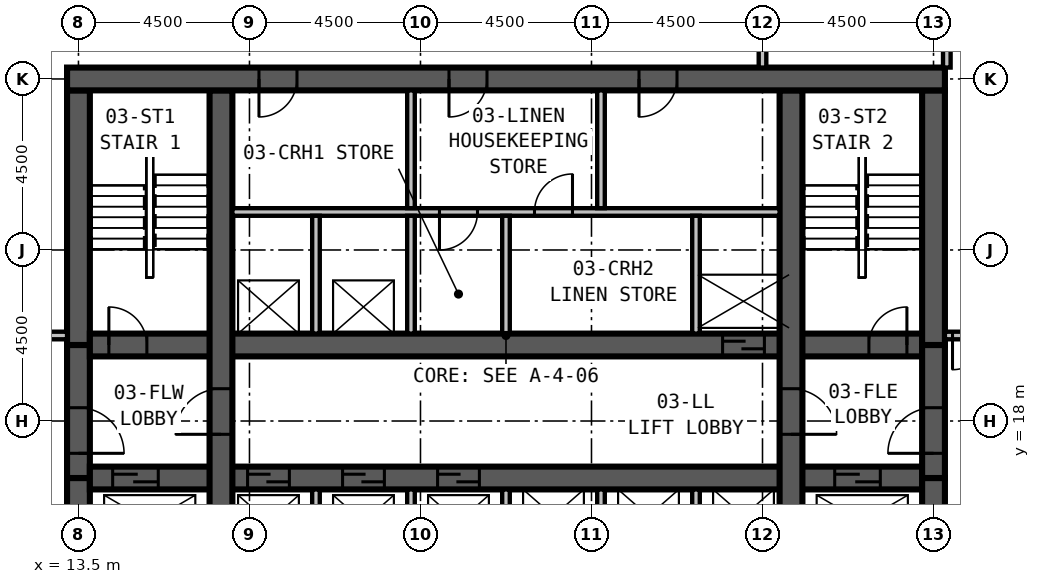
"""IFC4 building model, lengths in metres.
Left out: names, types, materials, properties, quantities, classifications, styles, units other than length and angle.
Written with IfcOpenShell. Run it as: python <this file> out.ifc"""

import sys

from ifc_helpers import new_model, si_unit, direction, frame, frame_2d, origin, place, context, subcontext, project, spatial, rectangle, extrude, element, fill, save


model = new_model("IFC4")
c1 = context("Model", 3, precision=1e-05, world=origin(), true_north=direction((0.0, 1.0)))
c2 = subcontext(c1, "Body", "Model", "MODEL_VIEW")
j1 = project(units=[si_unit("LENGTHUNIT", "METRE"), si_unit("PLANEANGLEUNIT", "RADIAN")], contexts=[c1])
p1 = place(None, origin())
s1 = spatial("IfcSite", under=j1, at=p1, CompositionType="ELEMENT")
p2 = place(p1, origin())
s2 = spatial("IfcBuilding", under=s1, at=p2, CompositionType="ELEMENT")
p3 = place(p2, frame((0.0, 0.0, 19.0)))
s3 = spatial("IfcBuildingStorey", under=s2, at=p3, CompositionType="ELEMENT", Elevation=19.0)
p4 = place(p3, frame((36.3, 27.0, 0.0), z_axis=(0.0, 0.0, 1.0), x_axis=(-1.0, 0.0, 0.0)))
e1 = element("IfcWall", 1, at=p4, inside=s3, PredefinedType="SHEAR", context=c2, shape_type="SweptSolid", body=[
    extrude(rectangle(XDim=23.1, YDim=0.6, at=frame_2d((11.55, 0.0))), origin(), (0.0, 0.0, 1.0), 5.0),
])
p5 = place(p4, frame((17.05, 0.0, 0.0)))
e2 = element("IfcOpeningElement", 2, at=p5, cuts=e1, PredefinedType="OPENING", context=c2, shape_type="SweptSolid", body=[
    extrude(rectangle(XDim=1.0, YDim=2.1, at=frame_2d((0.5, 1.05))), frame((0.0, 0.31, 0.0), z_axis=(0.0, -1.0, 0.0), x_axis=(1.0, 0.0, 0.0)), (0.0, 0.0, 1.0), 0.62),
])
p6 = place(p4, frame((12.05, 0.0, 0.0)))
e3 = element("IfcOpeningElement", 3, at=p6, cuts=e1, PredefinedType="OPENING", context=c2, shape_type="SweptSolid", body=[
    extrude(rectangle(XDim=1.0, YDim=2.1, at=frame_2d((0.5, 1.05))), frame((0.0, 0.31, 0.0), z_axis=(0.0, -1.0, 0.0), x_axis=(1.0, 0.0, 0.0)), (0.0, 0.0, 1.0), 0.62),
])
p7 = place(p4, frame((7.05, 0.0, 0.0)))
e4 = element("IfcOpeningElement", 4, at=p7, cuts=e1, PredefinedType="OPENING", context=c2, shape_type="SweptSolid", body=[
    extrude(rectangle(XDim=1.0, YDim=2.1, at=frame_2d((0.5, 1.05))), frame((0.0, 0.31, 0.0), z_axis=(0.0, -1.0, 0.0), x_axis=(1.0, 0.0, 0.0)), (0.0, 0.0, 1.0), 0.62),
])
p8 = place(p3, frame((17.25, 13.8, 0.0), z_axis=(0.0, 0.0, 1.0), x_axis=(0.0, 1.0, 0.0)))
e5 = element("IfcWall", 5, at=p8, inside=s3, PredefinedType="SHEAR", context=c2, shape_type="SweptSolid", body=[
    extrude(rectangle(XDim=12.9, YDim=0.6, at=frame_2d((6.45, 0.0))), origin(), (0.0, 0.0, 1.0), 5.0),
])
p9 = place(p8, frame((3.85, 0.0, 0.0)))
e6 = element("IfcOpeningElement", 6, at=p9, cuts=e5, PredefinedType="OPENING", context=c2, shape_type="SweptSolid", body=[
    extrude(rectangle(XDim=1.2, YDim=2.1, at=frame_2d((0.6, 1.05))), frame((0.0, 0.31, 0.0), z_axis=(0.0, -1.0, 0.0), x_axis=(1.0, 0.0, 0.0)), (0.0, 0.0, 1.0), 0.62),
])
p10 = place(p3, frame((32.25, 13.8, 0.0), z_axis=(0.0, 0.0, 1.0), x_axis=(0.0, 1.0, 0.0)))
e7 = element("IfcWall", 7, at=p10, inside=s3, PredefinedType="SHEAR", context=c2, shape_type="SweptSolid", body=[
    extrude(rectangle(XDim=12.9, YDim=0.6, at=frame_2d((6.45, 0.0))), origin(), (0.0, 0.0, 1.0), 5.0),
])
p11 = place(p10, frame((5.05, 0.0, 0.0), z_axis=(0.0, 0.0, 1.0), x_axis=(-1.0, 0.0, 0.0)))
e8 = element("IfcOpeningElement", 8, at=p11, cuts=e7, PredefinedType="OPENING", context=c2, shape_type="SweptSolid", body=[
    extrude(rectangle(XDim=1.2, YDim=2.1, at=frame_2d((0.6, 1.05))), frame((0.0, 0.31, 0.0), z_axis=(0.0, -1.0, 0.0), x_axis=(1.0, 0.0, 0.0)), (0.0, 0.0, 1.0), 0.62),
])
p12 = place(p3, frame((13.8, 16.5, 0.0), z_axis=(0.0, 0.0, 1.0), x_axis=(1.0, 0.0, 0.0)))
e9 = element("IfcWall", 9, at=p12, inside=s3, PredefinedType="SHEAR", context=c2, shape_type="SweptSolid", body=[
    extrude(rectangle(XDim=21.9, YDim=0.6, at=frame_2d((10.95, 0.0))), origin(), (0.0, 0.0, 1.0), 5.0),
])
p13 = place(p12, frame((4.15, 0.0, 0.0)))
e10 = element("IfcOpeningElement", 10, at=p13, cuts=e9, PredefinedType="OPENING", context=c2, shape_type="SweptSolid", body=[
    extrude(rectangle(XDim=1.1, YDim=2.1, at=frame_2d((0.55, 1.05))), frame((0.0, 0.31, 0.0), z_axis=(0.0, -1.0, 0.0), x_axis=(1.0, 0.0, 0.0)), (0.0, 0.0, 1.0), 0.62),
])
p14 = place(p12, frame((6.65, 0.0, 0.0)))
e11 = element("IfcOpeningElement", 11, at=p14, cuts=e9, PredefinedType="OPENING", context=c2, shape_type="SweptSolid", body=[
    extrude(rectangle(XDim=1.1, YDim=2.1, at=frame_2d((0.55, 1.05))), frame((0.0, 0.31, 0.0), z_axis=(0.0, -1.0, 0.0), x_axis=(1.0, 0.0, 0.0)), (0.0, 0.0, 1.0), 0.62),
])
p15 = place(p12, frame((9.15, 0.0, 0.0)))
e12 = element("IfcOpeningElement", 12, at=p15, cuts=e9, PredefinedType="OPENING", context=c2, shape_type="SweptSolid", body=[
    extrude(rectangle(XDim=1.1, YDim=2.1, at=frame_2d((0.55, 1.05))), frame((0.0, 0.31, 0.0), z_axis=(0.0, -1.0, 0.0), x_axis=(1.0, 0.0, 0.0)), (0.0, 0.0, 1.0), 0.62),
])
p16 = place(p12, frame((0.6, 0.0, 0.0)))
e13 = element("IfcOpeningElement", 13, at=p16, cuts=e9, PredefinedType="OPENING", context=c2, shape_type="SweptSolid", body=[
    extrude(rectangle(XDim=1.2, YDim=2.1, at=frame_2d((0.6, 1.05))), frame((0.0, 0.31, 0.0), z_axis=(0.0, -1.0, 0.0), x_axis=(1.0, 0.0, 0.0)), (0.0, 0.0, 1.0), 0.62),
])
p17 = place(p12, frame((19.6, 0.0, 0.0)))
e14 = element("IfcOpeningElement", 14, at=p17, cuts=e9, PredefinedType="OPENING", context=c2, shape_type="SweptSolid", body=[
    extrude(rectangle(XDim=1.2, YDim=2.1, at=frame_2d((0.6, 1.05))), frame((0.0, 0.31, 0.0), z_axis=(0.0, -1.0, 0.0), x_axis=(1.0, 0.0, 0.0)), (0.0, 0.0, 1.0), 0.62),
])
p18 = place(p3, frame((13.8, 20.0, 0.0), z_axis=(0.0, 0.0, 1.0), x_axis=(1.0, 0.0, 0.0)))
e15 = element("IfcWall", 15, at=p18, inside=s3, PredefinedType="SHEAR", context=c2, shape_type="SweptSolid", body=[
    extrude(rectangle(XDim=21.9, YDim=0.6, at=frame_2d((10.95, 0.0))), origin(), (0.0, 0.0, 1.0), 5.0),
])
p19 = place(p18, frame((0.5, 0.0, 0.0)))
e16 = element("IfcOpeningElement", 16, at=p19, cuts=e15, PredefinedType="OPENING", context=c2, shape_type="SweptSolid", body=[
    extrude(rectangle(XDim=1.0, YDim=2.1, at=frame_2d((0.5, 1.05))), frame((0.0, 0.31, 0.0), z_axis=(0.0, -1.0, 0.0), x_axis=(1.0, 0.0, 0.0)), (0.0, 0.0, 1.0), 0.62),
])
p20 = place(p18, frame((20.5, 0.0, 0.0)))
e17 = element("IfcOpeningElement", 17, at=p20, cuts=e15, PredefinedType="OPENING", context=c2, shape_type="SweptSolid", body=[
    extrude(rectangle(XDim=1.0, YDim=2.1, at=frame_2d((0.5, 1.05))), frame((0.0, 0.31, 0.0), z_axis=(0.0, -1.0, 0.0), x_axis=(1.0, 0.0, 0.0)), (0.0, 0.0, 1.0), 0.62),
])
p21 = place(p18, frame((16.65, 0.0, 0.0)))
e18 = element("IfcOpeningElement", 18, at=p21, cuts=e15, PredefinedType="OPENING", context=c2, shape_type="SweptSolid", body=[
    extrude(rectangle(XDim=1.1, YDim=2.1, at=frame_2d((0.55, 1.05))), frame((0.0, 0.31, 0.0), z_axis=(0.0, -1.0, 0.0), x_axis=(1.0, 0.0, 0.0)), (0.0, 0.0, 1.0), 0.62),
])
p22 = place(p3, frame((13.5, 26.7, 0.0), z_axis=(0.0, 0.0, 1.0), x_axis=(0.0, -1.0, 0.0)))
e19 = element("IfcWall", 19, at=p22, inside=s3, PredefinedType="SHEAR", context=c2, shape_type="SweptSolid", body=[
    extrude(rectangle(XDim=6.7, YDim=0.6, at=frame_2d((3.35, 0.0))), origin(), (0.0, 0.0, 1.0), 5.0),
])
p23 = place(p3, frame((13.5, 20.0, 0.0), z_axis=(0.0, 0.0, 1.0), x_axis=(0.0, -1.0, 0.0)))
e20 = element("IfcWall", 20, at=p23, inside=s3, PredefinedType="SHEAR", context=c2, shape_type="SweptSolid", body=[
    extrude(rectangle(XDim=3.5, YDim=0.6, at=frame_2d((1.75, 0.0))), origin(), (0.0, 0.0, 1.0), 5.0),
])
p24 = place(p23, frame((1.65, 0.0, 0.0)))
e21 = element("IfcOpeningElement", 21, at=p24, cuts=e20, PredefinedType="OPENING", context=c2, shape_type="SweptSolid", body=[
    extrude(rectangle(XDim=1.2, YDim=2.1, at=frame_2d((0.6, 1.05))), frame((0.0, 0.31, 0.0), z_axis=(0.0, -1.0, 0.0), x_axis=(1.0, 0.0, 0.0)), (0.0, 0.0, 1.0), 0.62),
])
for number, where, z_axis, x_axis in (
    (22, (13.5, 16.5, 0.0), (0.0, 0.0, 1.0), (0.0, -1.0, 0.0)),
    (23, (36.0, 13.8, 0.0), (0.0, 0.0, 1.0), (0.0, 1.0, 0.0)),
):
    element("IfcWall", number, at=place(p3, frame(where, z_axis=z_axis, x_axis=x_axis)), inside=s3, PredefinedType="SHEAR", context=c2, shape_type="SweptSolid", body=[
        extrude(rectangle(XDim=2.7, YDim=0.6, at=frame_2d((1.35, 0.0))), origin(), (0.0, 0.0, 1.0), 5.0),
    ])
p25 = place(p3, frame((36.0, 16.5, 0.0), z_axis=(0.0, 0.0, 1.0), x_axis=(0.0, 1.0, 0.0)))
e24 = element("IfcWall", 24, at=p25, inside=s3, PredefinedType="SHEAR", context=c2, shape_type="SweptSolid", body=[
    extrude(rectangle(XDim=3.5, YDim=0.6, at=frame_2d((1.75, 0.0))), origin(), (0.0, 0.0, 1.0), 5.0),
])
p26 = place(p25, frame((0.65, 0.0, 0.0)))
e25 = element("IfcOpeningElement", 25, at=p26, cuts=e24, PredefinedType="OPENING", context=c2, shape_type="SweptSolid", body=[
    extrude(rectangle(XDim=1.2, YDim=2.1, at=frame_2d((0.6, 1.05))), frame((0.0, 0.31, 0.0), z_axis=(0.0, -1.0, 0.0), x_axis=(1.0, 0.0, 0.0)), (0.0, 0.0, 1.0), 0.62),
])
p27 = place(p3, frame((36.0, 20.0, 0.0), z_axis=(0.0, 0.0, 1.0), x_axis=(0.0, 1.0, 0.0)))
e26 = element("IfcWall", 26, at=p27, inside=s3, PredefinedType="SHEAR", context=c2, shape_type="SweptSolid", body=[
    extrude(rectangle(XDim=6.7, YDim=0.6, at=frame_2d((3.35, 0.0))), origin(), (0.0, 0.0, 1.0), 5.0),
])
p28 = place(p3, frame((-0.9, 20.25, 0.0), z_axis=(0.0, 0.0, 1.0), x_axis=(1.0, 0.0, 0.0)))
e27 = element("IfcWall", 27, at=p28, inside=s3, PredefinedType="PARTITIONING", context=c2, shape_type="SweptSolid", body=[
    extrude(rectangle(XDim=14.1, YDim=0.2, at=frame_2d((7.05, 0.0))), origin(), (0.0, 0.0, 1.0), 4.7),
])
p29 = place(p28, frame((5.0, 0.0, 0.0)))
e28 = element("IfcOpeningElement", 28, at=p29, cuts=e27, PredefinedType="OPENING", context=c2, shape_type="SweptSolid", body=[
    extrude(rectangle(XDim=1.8, YDim=2.4, at=frame_2d((0.9, 1.2))), frame((0.0, 0.11, 0.0), z_axis=(0.0, -1.0, 0.0), x_axis=(1.0, 0.0, 0.0)), (0.0, 0.0, 1.0), 0.22),
])
p30 = place(p3, frame((36.3, 20.25, 0.0), z_axis=(0.0, 0.0, 1.0), x_axis=(1.0, 0.0, 0.0)))
e29 = element("IfcWall", 29, at=p30, inside=s3, PredefinedType="PARTITIONING", context=c2, shape_type="SweptSolid", body=[
    extrude(rectangle(XDim=13.2, YDim=0.2, at=frame_2d((6.6, 0.0))), origin(), (0.0, 0.0, 1.0), 4.7),
])
p31 = place(p30, frame((2.0, 0.0, 0.0), z_axis=(0.0, 0.0, 1.0), x_axis=(-1.0, 0.0, 0.0)))
e30 = element("IfcOpeningElement", 30, at=p31, cuts=e29, PredefinedType="OPENING", context=c2, shape_type="SweptSolid", body=[
    extrude(rectangle(XDim=1.8, YDim=2.4, at=frame_2d((0.9, 1.2))), frame((0.0, 0.11, 0.0), z_axis=(0.0, -1.0, 0.0), x_axis=(1.0, 0.0, 0.0)), (0.0, 0.0, 1.0), 0.22),
])
p32 = place(p3, frame((31.5, 27.3, 0.0), z_axis=(0.0, 0.0, 1.0), x_axis=(0.0, 1.0, 0.0)))
e31 = element("IfcWall", 31, at=p32, inside=s3, PredefinedType="PARTITIONING", context=c2, shape_type="SweptSolid", body=[
    extrude(rectangle(XDim=11.8, YDim=0.2, at=frame_2d((5.9, 0.0))), origin(), (0.0, 0.0, 1.0), 3.6),
])
p33 = place(p3, frame((36.35, 27.3, 0.0), z_axis=(0.0, 0.0, 1.0), x_axis=(0.0, 1.0, 0.0)))
e32 = element("IfcWall", 32, at=p33, inside=s3, PredefinedType="PARTITIONING", context=c2, shape_type="SweptSolid", body=[
    extrude(rectangle(XDim=2.7, YDim=0.2, at=frame_2d((1.35, 0.0))), origin(), (0.0, 0.0, 1.0), 3.6),
])
p34 = place(p3, frame((19.75, 13.8, 0.0), z_axis=(0.0, 0.0, 1.0), x_axis=(0.0, 1.0, 0.0)))
e33 = element("IfcWall", 33, at=p34, inside=s3, PredefinedType="PARTITIONING", context=c2, shape_type="SweptSolid", body=[
    extrude(rectangle(XDim=2.4, YDim=0.2, at=frame_2d((1.2, 0.0))), origin(), (0.0, 0.0, 1.0), 4.7),
])
p35 = place(p3, frame((19.75, 20.3, 0.0), z_axis=(0.0, 0.0, 1.0), x_axis=(0.0, 1.0, 0.0)))
e34 = element("IfcWall", 34, at=p35, inside=s3, PredefinedType="PARTITIONING", context=c2, shape_type="SweptSolid", body=[
    extrude(rectangle(XDim=3.1, YDim=0.2, at=frame_2d((1.55, 0.0))), origin(), (0.0, 0.0, 1.0), 4.7),
])
p36 = place(p3, frame((22.25, 13.8, 0.0), z_axis=(0.0, 0.0, 1.0), x_axis=(0.0, 1.0, 0.0)))
e35 = element("IfcWall", 35, at=p36, inside=s3, PredefinedType="PARTITIONING", context=c2, shape_type="SweptSolid", body=[
    extrude(rectangle(XDim=2.4, YDim=0.2, at=frame_2d((1.2, 0.0))), origin(), (0.0, 0.0, 1.0), 4.7),
])
p37 = place(p3, frame((22.25, 20.3, 0.0), z_axis=(0.0, 0.0, 1.0), x_axis=(0.0, 1.0, 0.0)))
e36 = element("IfcWall", 36, at=p37, inside=s3, PredefinedType="PARTITIONING", context=c2, shape_type="SweptSolid", body=[
    extrude(rectangle(XDim=3.1, YDim=0.2, at=frame_2d((1.55, 0.0))), origin(), (0.0, 0.0, 1.0), 4.7),
])
p38 = place(p3, frame((24.75, 13.8, 0.0), z_axis=(0.0, 0.0, 1.0), x_axis=(0.0, 1.0, 0.0)))
e37 = element("IfcWall", 37, at=p38, inside=s3, PredefinedType="PARTITIONING", context=c2, shape_type="SweptSolid", body=[
    extrude(rectangle(XDim=2.4, YDim=0.2, at=frame_2d((1.2, 0.0))), origin(), (0.0, 0.0, 1.0), 4.7),
])
p39 = place(p3, frame((24.75, 20.3, 0.0), z_axis=(0.0, 0.0, 1.0), x_axis=(0.0, 1.0, 0.0)))
e38 = element("IfcWall", 38, at=p39, inside=s3, PredefinedType="PARTITIONING", context=c2, shape_type="SweptSolid", body=[
    extrude(rectangle(XDim=3.1, YDim=0.2, at=frame_2d((1.55, 0.0))), origin(), (0.0, 0.0, 1.0), 4.7),
])
for number, where, z_axis, x_axis in (
    (39, (27.25, 13.8, 0.0), (0.0, 0.0, 1.0), (0.0, 1.0, 0.0)),
    (40, (29.75, 13.8, 0.0), (0.0, 0.0, 1.0), (0.0, 1.0, 0.0)),
):
    element("IfcWall", number, at=place(p3, frame(where, z_axis=z_axis, x_axis=x_axis)), inside=s3, PredefinedType="PARTITIONING", context=c2, shape_type="SweptSolid", body=[
        extrude(rectangle(XDim=2.4, YDim=0.2, at=frame_2d((1.2, 0.0))), origin(), (0.0, 0.0, 1.0), 4.7),
    ])
p40 = place(p3, frame((29.75, 20.3, 0.0), z_axis=(0.0, 0.0, 1.0), x_axis=(0.0, 1.0, 0.0)))
e41 = element("IfcWall", 41, at=p40, inside=s3, PredefinedType="PARTITIONING", context=c2, shape_type="SweptSolid", body=[
    extrude(rectangle(XDim=3.1, YDim=0.2, at=frame_2d((1.55, 0.0))), origin(), (0.0, 0.0, 1.0), 4.7),
])
p41 = place(p3, frame((17.55, 23.5, 0.0), z_axis=(0.0, 0.0, 1.0), x_axis=(1.0, 0.0, 0.0)))
e42 = element("IfcWall", 42, at=p41, inside=s3, PredefinedType="PARTITIONING", context=c2, shape_type="SweptSolid", body=[
    extrude(rectangle(XDim=14.4, YDim=0.2, at=frame_2d((7.2, 0.0))), origin(), (0.0, 0.0, 1.0), 4.7),
])
p42 = place(p41, frame((6.45, 0.0, 0.0), z_axis=(0.0, 0.0, 1.0), x_axis=(-1.0, 0.0, 0.0)))
e43 = element("IfcOpeningElement", 43, at=p42, cuts=e42, PredefinedType="OPENING", context=c2, shape_type="SweptSolid", body=[
    extrude(rectangle(XDim=1.0, YDim=2.1, at=frame_2d((0.5, 1.05))), frame((0.0, 0.11, 0.0), z_axis=(0.0, -1.0, 0.0), x_axis=(1.0, 0.0, 0.0)), (0.0, 0.0, 1.0), 0.22),
])
p43 = place(p41, frame((7.95, 0.0, 0.0)))
e44 = element("IfcOpeningElement", 44, at=p43, cuts=e42, PredefinedType="OPENING", context=c2, shape_type="SweptSolid", body=[
    extrude(rectangle(XDim=1.0, YDim=2.1, at=frame_2d((0.5, 1.05))), frame((0.0, 0.11, 0.0), z_axis=(0.0, -1.0, 0.0), x_axis=(1.0, 0.0, 0.0)), (0.0, 0.0, 1.0), 0.22),
])
for number, where, z_axis, x_axis in (
    (45, (22.25, 23.6, 0.0), (0.0, 0.0, 1.0), (0.0, 1.0, 0.0)),
    (46, (27.25, 23.6, 0.0), (0.0, 0.0, 1.0), (0.0, 1.0, 0.0)),
):
    element("IfcWall", number, at=place(p3, frame(where, z_axis=z_axis, x_axis=x_axis)), inside=s3, PredefinedType="PARTITIONING", context=c2, shape_type="SweptSolid", body=[
        extrude(rectangle(XDim=3.1, YDim=0.2, at=frame_2d((1.55, 0.0))), origin(), (0.0, 0.0, 1.0), 4.7),
    ])
p44 = place(p31, origin())
e47 = element("IfcDoor", 47, at=p44, inside=s3, OperationType="DOUBLE_DOOR_SINGLE_SWING", PredefinedType="DOOR", context=c2, shape_type="SweptSolid", body=[
    extrude(rectangle(XDim=1.8, YDim=2.4, at=frame_2d((0.9, 1.2))), frame((0.0, 0.025, 0.0), z_axis=(0.0, -1.0, 0.0), x_axis=(1.0, 0.0, 0.0)), (0.0, 0.0, 1.0), 0.05),
])
fill(e30, e47)
p45 = place(p42, origin())
e48 = element("IfcDoor", 48, at=p45, inside=s3, OperationType="SINGLE_SWING_RIGHT", PredefinedType="DOOR", context=c2, shape_type="SweptSolid", body=[
    extrude(rectangle(XDim=1.0, YDim=2.1, at=frame_2d((0.5, 1.05))), frame((0.0, 0.025, 0.0), z_axis=(0.0, -1.0, 0.0), x_axis=(1.0, 0.0, 0.0)), (0.0, 0.0, 1.0), 0.05),
])
fill(e43, e48)
p46 = place(p43, origin())
e49 = element("IfcDoor", 49, at=p46, inside=s3, OperationType="SINGLE_SWING_RIGHT", PredefinedType="DOOR", context=c2, shape_type="SweptSolid", body=[
    extrude(rectangle(XDim=1.0, YDim=2.1, at=frame_2d((0.5, 1.05))), frame((0.0, 0.025, 0.0), z_axis=(0.0, -1.0, 0.0), x_axis=(1.0, 0.0, 0.0)), (0.0, 0.0, 1.0), 0.05),
])
fill(e44, e49)
p47 = place(p24, origin())
e50 = element("IfcDoor", 50, at=p47, inside=s3, OperationType="SINGLE_SWING_RIGHT", PredefinedType="DOOR", context=c2, shape_type="SweptSolid", body=[
    extrude(rectangle(XDim=1.2, YDim=2.1, at=frame_2d((0.6, 1.05))), frame((0.0, 0.3, 0.0), z_axis=(0.0, -1.0, 0.0), x_axis=(1.0, 0.0, 0.0)), (0.0, 0.0, 1.0), 0.6),
])
fill(e21, e50)
p48 = place(p26, origin())
e51 = element("IfcDoor", 51, at=p48, inside=s3, OperationType="SINGLE_SWING_LEFT", PredefinedType="DOOR", context=c2, shape_type="SweptSolid", body=[
    extrude(rectangle(XDim=1.2, YDim=2.1, at=frame_2d((0.6, 1.05))), frame((0.0, 0.3, 0.0), z_axis=(0.0, -1.0, 0.0), x_axis=(1.0, 0.0, 0.0)), (0.0, 0.0, 1.0), 0.6),
])
fill(e25, e51)
p49 = place(p9, origin())
e52 = element("IfcDoor", 52, at=p49, inside=s3, OperationType="SINGLE_SWING_LEFT", PredefinedType="DOOR", context=c2, shape_type="SweptSolid", body=[
    extrude(rectangle(XDim=1.2, YDim=2.1, at=frame_2d((0.6, 1.05))), frame((0.0, 0.3, 0.0), z_axis=(0.0, -1.0, 0.0), x_axis=(1.0, 0.0, 0.0)), (0.0, 0.0, 1.0), 0.6),
])
fill(e6, e52)
p50 = place(p11, origin())
e53 = element("IfcDoor", 53, at=p50, inside=s3, OperationType="SINGLE_SWING_RIGHT", PredefinedType="DOOR", context=c2, shape_type="SweptSolid", body=[
    extrude(rectangle(XDim=1.2, YDim=2.1, at=frame_2d((0.6, 1.05))), frame((0.0, 0.3, 0.0), z_axis=(0.0, -1.0, 0.0), x_axis=(1.0, 0.0, 0.0)), (0.0, 0.0, 1.0), 0.6),
])
fill(e8, e53)
p51 = place(p19, origin())
e54 = element("IfcDoor", 54, at=p51, inside=s3, OperationType="SINGLE_SWING_LEFT", PredefinedType="DOOR", context=c2, shape_type="SweptSolid", body=[
    extrude(rectangle(XDim=1.0, YDim=2.1, at=frame_2d((0.5, 1.05))), frame((0.0, 0.3, 0.0), z_axis=(0.0, -1.0, 0.0), x_axis=(1.0, 0.0, 0.0)), (0.0, 0.0, 1.0), 0.6),
])
fill(e16, e54)
p52 = place(p20, origin())
e55 = element("IfcDoor", 55, at=p52, inside=s3, OperationType="SINGLE_SWING_RIGHT", PredefinedType="DOOR", context=c2, shape_type="SweptSolid", body=[
    extrude(rectangle(XDim=1.0, YDim=2.1, at=frame_2d((0.5, 1.05))), frame((0.0, 0.3, 0.0), z_axis=(0.0, -1.0, 0.0), x_axis=(1.0, 0.0, 0.0)), (0.0, 0.0, 1.0), 0.6),
])
fill(e17, e55)
p53 = place(p13, origin())
e56 = element("IfcDoor", 56, at=p53, inside=s3, OperationType="SLIDING_TO_LEFT", PredefinedType="DOOR", context=c2, shape_type="SweptSolid", body=[
    extrude(rectangle(XDim=1.1, YDim=2.1, at=frame_2d((0.55, 1.05))), frame((0.0, 0.3, 0.0), z_axis=(0.0, -1.0, 0.0), x_axis=(1.0, 0.0, 0.0)), (0.0, 0.0, 1.0), 0.6),
])
fill(e10, e56)
p54 = place(p14, origin())
e57 = element("IfcDoor", 57, at=p54, inside=s3, OperationType="SLIDING_TO_LEFT", PredefinedType="DOOR", context=c2, shape_type="SweptSolid", body=[
    extrude(rectangle(XDim=1.1, YDim=2.1, at=frame_2d((0.55, 1.05))), frame((0.0, 0.3, 0.0), z_axis=(0.0, -1.0, 0.0), x_axis=(1.0, 0.0, 0.0)), (0.0, 0.0, 1.0), 0.6),
])
fill(e11, e57)
p55 = place(p15, origin())
e58 = element("IfcDoor", 58, at=p55, inside=s3, OperationType="SLIDING_TO_LEFT", PredefinedType="DOOR", context=c2, shape_type="SweptSolid", body=[
    extrude(rectangle(XDim=1.1, YDim=2.1, at=frame_2d((0.55, 1.05))), frame((0.0, 0.3, 0.0), z_axis=(0.0, -1.0, 0.0), x_axis=(1.0, 0.0, 0.0)), (0.0, 0.0, 1.0), 0.6),
])
fill(e12, e58)
p56 = place(p21, origin())
e59 = element("IfcDoor", 59, at=p56, inside=s3, OperationType="SLIDING_TO_LEFT", PredefinedType="DOOR", context=c2, shape_type="SweptSolid", body=[
    extrude(rectangle(XDim=1.1, YDim=2.1, at=frame_2d((0.55, 1.05))), frame((0.0, 0.3, 0.0), z_axis=(0.0, -1.0, 0.0), x_axis=(1.0, 0.0, 0.0)), (0.0, 0.0, 1.0), 0.6),
])
fill(e18, e59)
p57 = place(p16, origin())
e60 = element("IfcDoor", 60, at=p57, inside=s3, OperationType="SLIDING_TO_LEFT", PredefinedType="DOOR", context=c2, shape_type="SweptSolid", body=[
    extrude(rectangle(XDim=1.2, YDim=2.1, at=frame_2d((0.6, 1.05))), frame((0.0, 0.3, 0.0), z_axis=(0.0, -1.0, 0.0), x_axis=(1.0, 0.0, 0.0)), (0.0, 0.0, 1.0), 0.6),
])
fill(e13, e60)
p58 = place(p17, origin())
e61 = element("IfcDoor", 61, at=p58, inside=s3, OperationType="SLIDING_TO_LEFT", PredefinedType="DOOR", context=c2, shape_type="SweptSolid", body=[
    extrude(rectangle(XDim=1.2, YDim=2.1, at=frame_2d((0.6, 1.05))), frame((0.0, 0.3, 0.0), z_axis=(0.0, -1.0, 0.0), x_axis=(1.0, 0.0, 0.0)), (0.0, 0.0, 1.0), 0.6),
])
fill(e14, e61)
p59 = place(p5, origin())
e62 = element("IfcDoor", 62, at=p59, inside=s3, OperationType="SINGLE_SWING_RIGHT", PredefinedType="DOOR", context=c2, shape_type="SweptSolid", body=[
    extrude(rectangle(XDim=1.0, YDim=2.1, at=frame_2d((0.5, 1.05))), frame((0.0, 0.3, 0.0), z_axis=(0.0, -1.0, 0.0), x_axis=(1.0, 0.0, 0.0)), (0.0, 0.0, 1.0), 0.6),
])
fill(e2, e62)
p60 = place(p6, origin())
e63 = element("IfcDoor", 63, at=p60, inside=s3, OperationType="SINGLE_SWING_RIGHT", PredefinedType="DOOR", context=c2, shape_type="SweptSolid", body=[
    extrude(rectangle(XDim=1.0, YDim=2.1, at=frame_2d((0.5, 1.05))), frame((0.0, 0.3, 0.0), z_axis=(0.0, -1.0, 0.0), x_axis=(1.0, 0.0, 0.0)), (0.0, 0.0, 1.0), 0.6),
])
fill(e3, e63)
p61 = place(p7, origin())
e64 = element("IfcDoor", 64, at=p61, inside=s3, OperationType="SINGLE_SWING_RIGHT", PredefinedType="DOOR", context=c2, shape_type="SweptSolid", body=[
    extrude(rectangle(XDim=1.0, YDim=2.1, at=frame_2d((0.5, 1.05))), frame((0.0, 0.3, 0.0), z_axis=(0.0, -1.0, 0.0), x_axis=(1.0, 0.0, 0.0)), (0.0, 0.0, 1.0), 0.6),
])
fill(e4, e64)
save(model, sys.argv[1])
